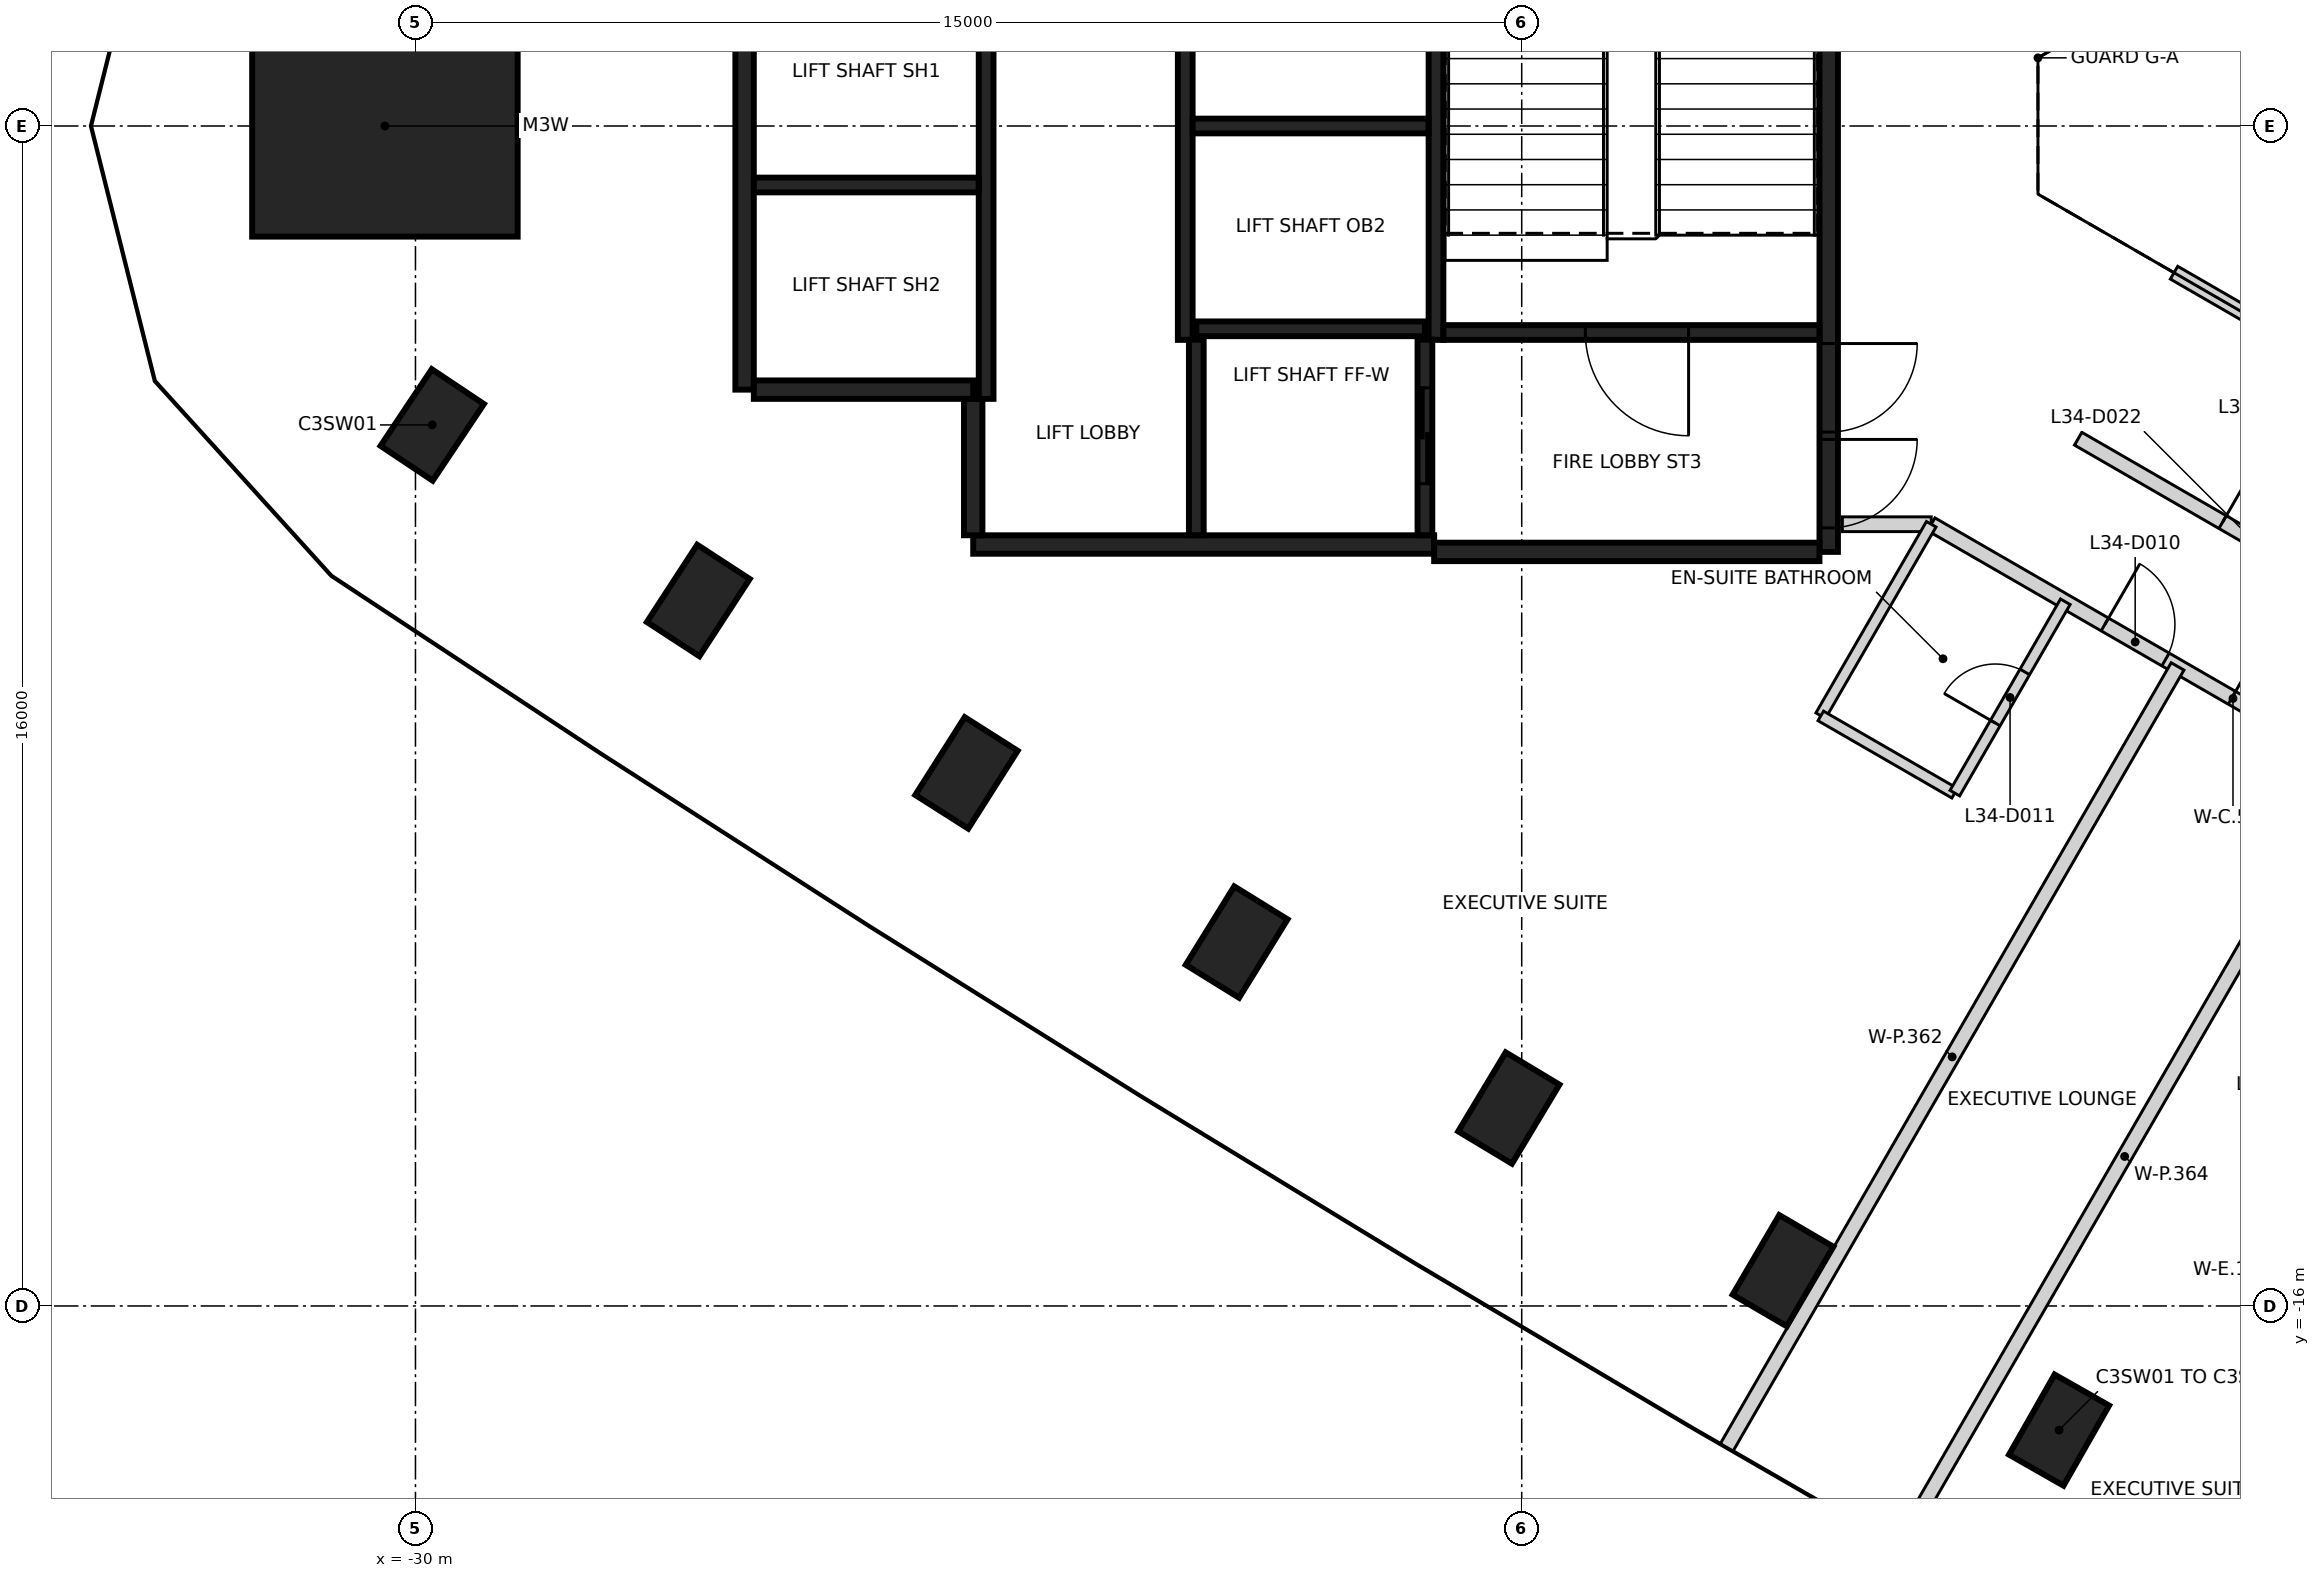
"""IFC4 building model, lengths in metres.
Left out: names, types, materials, properties, quantities, classifications, styles, units other than length and angle.
Written with IfcOpenShell. Run it as: python <this file> out.ifc"""

import sys

from ifc_helpers import new_model, si_unit, direction, frame, frame_2d, origin, origin_2d, place, context, subcontext, project, spatial, rectangle, extrude, element, fill, save


model = new_model("IFC4")
c1 = context("Model", 3, precision=1e-05, world=origin(), true_north=direction((0.0, 1.0)))
c2 = subcontext(c1, "Body", "Model", "MODEL_VIEW")
j1 = project(units=[si_unit("LENGTHUNIT", "METRE"), si_unit("PLANEANGLEUNIT", "RADIAN")], contexts=[c1])
p1 = place(None, origin())
s1 = spatial("IfcSite", under=j1, at=p1, CompositionType="ELEMENT")
p2 = place(p1, origin())
s2 = spatial("IfcBuilding", under=s1, at=p2, CompositionType="ELEMENT")
p3 = place(p2, frame((0.0, 0.0, 139.6)))
s3 = spatial("IfcBuildingStorey", under=s2, at=p3, CompositionType="ELEMENT", Elevation=139.6)
for number, where, z_axis, x_axis in (
    (1, (-29.773, -4.053, -0.4), (0.0, 0.0, 1.0), (0.556, 0.831, 0.0)),
    (2, (-26.165, -6.434, -0.4), (0.0, 0.0, 1.0), (0.546, 0.838, 0.0)),
    (3, (-22.529, -8.772, -0.4), (0.0, 0.0, 1.0), (0.536, 0.844, 0.0)),
    (4, (-18.865, -11.066, -0.4), (0.0, 0.0, 1.0), (0.526, 0.851, 0.0)),
    (5, (-15.175, -13.316, -0.4), (0.0, 0.0, 1.0), (0.515, 0.857, 0.0)),
    (6, (-11.457, -15.522, -0.4), (0.0, 0.0, 1.0), (0.505, 0.863, 0.0)),
    (7, (-7.714, -17.683, -0.4), (0.0, 0.0, 1.0), (0.495, 0.869, 0.0)),
):
    element("IfcColumn", number, at=place(p3, frame(where, z_axis=z_axis, x_axis=x_axis)), inside=s3, PredefinedType="COLUMN", context=c2, shape_type="SweptSolid", body=[
        extrude(rectangle(XDim=1.25, YDim=0.85, at=origin_2d()), origin(), (0.0, 0.0, 1.0), 3.6),
    ])
p4 = place(p3, frame((-30.414, 0.0, -0.4), z_axis=(0.0, 0.0, 1.0), x_axis=(1.0, 0.0, 0.0)))
e8 = element("IfcColumn", 8, at=p4, inside=s3, PredefinedType="COLUMN", context=c2, shape_type="SweptSolid", body=[
    extrude(rectangle(XDim=3.6, YDim=3.0, at=origin_2d()), origin(), (0.0, 0.0, 1.0), 3.6),
])
p5 = place(p3, frame((-10.837, 5.775, 0.0), z_axis=(0.0, 0.0, 1.0), x_axis=(0.0, -1.0, 0.0)))
e9 = element("IfcWall", 9, at=p5, inside=s3, PredefinedType="SHEAR", context=c2, shape_type="SweptSolid", body=[
    extrude(rectangle(XDim=11.55, YDim=0.25, at=frame_2d((5.775, 0.0))), origin(), (0.0, 0.0, 1.0), 3.2),
])
p6 = place(p5, frame((10.025, 0.0, 0.0)))
e10 = element("IfcOpeningElement", 10, at=p6, cuts=e9, PredefinedType="OPENING", context=c2, shape_type="SweptSolid", body=[
    extrude(rectangle(XDim=1.2, YDim=2.1, at=frame_2d((0.6, 1.05))), frame((0.0, 0.135, 0.0), z_axis=(0.0, -1.0, 0.0), x_axis=(1.0, 0.0, 0.0)), (0.0, 0.0, 1.0), 0.27),
])
p7 = place(p5, frame((8.725, 0.0, 0.0)))
e11 = element("IfcOpeningElement", 11, at=p7, cuts=e9, PredefinedType="OPENING", context=c2, shape_type="SweptSolid", body=[
    extrude(rectangle(XDim=1.2, YDim=2.1, at=frame_2d((0.6, 1.05))), frame((0.0, 0.135, 0.0), z_axis=(0.0, -1.0, 0.0), x_axis=(1.0, 0.0, 0.0)), (0.0, 0.0, 1.0), 0.27),
])
p8 = place(p3, frame((-16.187, -5.675, 0.0), z_axis=(0.0, 0.0, 1.0), x_axis=(-1.0, 0.0, 0.0)))
e12 = element("IfcWall", 12, at=p8, inside=s3, PredefinedType="SHEAR", context=c2, shape_type="SweptSolid", body=[
    extrude(rectangle(XDim=6.25, YDim=0.25, at=frame_2d((3.125, 0.0))), origin(), (0.0, 0.0, 1.0), 3.2),
])
p9 = place(p3, frame((-25.537, -3.575, 0.0), z_axis=(0.0, 0.0, 1.0), x_axis=(0.0, 1.0, 0.0)))
e13 = element("IfcWall", 13, at=p9, inside=s3, PredefinedType="SHEAR", context=c2, shape_type="SweptSolid", body=[
    extrude(rectangle(XDim=5.85, YDim=0.25, at=frame_2d((2.925, 0.0))), origin(), (0.0, 0.0, 1.0), 3.2),
])
p10 = place(p3, frame((-10.963, -5.775, 0.0), z_axis=(0.0, 0.0, 1.0), x_axis=(-1.0, 0.0, 0.0)))
e14 = element("IfcWall", 14, at=p10, inside=s3, PredefinedType="SHEAR", context=c2, shape_type="SweptSolid", body=[
    extrude(rectangle(XDim=5.225, YDim=0.25, at=frame_2d((2.612, 0.0))), origin(), (0.0, 0.0, 1.0), 3.2),
])
p11 = place(p3, frame((-22.437, -3.575, 0.0), z_axis=(0.0, 0.0, 1.0), x_axis=(-1.0, 0.0, 0.0)))
e15 = element("IfcWall", 15, at=p11, inside=s3, PredefinedType="SHEAR", context=c2, shape_type="SweptSolid", body=[
    extrude(rectangle(XDim=2.975, YDim=0.25, at=frame_2d((1.487, 0.0))), origin(), (0.0, 0.0, 1.0), 3.2),
])
p12 = place(p3, frame((-22.437, -5.55, 0.0), z_axis=(0.0, 0.0, 1.0), x_axis=(0.0, 1.0, 0.0)))
e16 = element("IfcWall", 16, at=p12, inside=s3, PredefinedType="SHEAR", context=c2, shape_type="SweptSolid", body=[
    extrude(rectangle(XDim=1.849, YDim=0.25, at=frame_2d((0.925, 0.0))), origin(), (0.0, 0.0, 1.0), 3.2),
])
p13 = place(p3, frame((-16.162, 2.951, 0.0), z_axis=(0.0, 0.0, 1.0), x_axis=(0.0, -1.0, 0.0)))
e17 = element("IfcWall", 17, at=p13, inside=s3, PredefinedType="SHEAR", context=c2, shape_type="SweptSolid", body=[
    extrude(rectangle(XDim=5.851, YDim=0.2, at=frame_2d((2.925, 0.0))), origin(), (0.0, 0.0, 1.0), 3.2),
])
for number, where, z_axis, x_axis in (
    (18, (-19.562, -2.9, 0.0), (0.0, 0.0, 1.0), (0.0, 1.0, 0.0)),
    (19, (-22.262, 2.4, 0.0), (0.0, 0.0, 1.0), (0.0, -1.0, 0.0)),
):
    element("IfcWall", number, at=place(p3, frame(where, z_axis=z_axis, x_axis=x_axis)), inside=s3, PredefinedType="SHEAR", context=c2, shape_type="SweptSolid", body=[
        extrude(rectangle(XDim=6.1, YDim=0.2, at=frame_2d((3.05, 0.0))), origin(), (0.0, 0.0, 1.0), 3.2),
    ])
p14 = place(p3, frame((-10.963, -2.8, 0.0), z_axis=(0.0, 0.0, 1.0), x_axis=(-1.0, 0.0, 0.0)))
e20 = element("IfcWall", 20, at=p14, inside=s3, PredefinedType="SHEAR", context=c2, shape_type="SweptSolid", body=[
    extrude(rectangle(XDim=5.098, YDim=0.2, at=frame_2d((2.549, 0.0))), origin(), (0.0, 0.0, 1.0), 3.2),
])
p15 = place(p14, frame((1.774, 0.0, 0.0)))
e21 = element("IfcOpeningElement", 21, at=p15, cuts=e20, PredefinedType="OPENING", context=c2, shape_type="SweptSolid", body=[
    extrude(rectangle(XDim=1.4, YDim=2.1, at=frame_2d((0.7, 1.05))), frame((0.0, 0.11, 0.0), z_axis=(0.0, -1.0, 0.0), x_axis=(1.0, 0.0, 0.0)), (0.0, 0.0, 1.0), 0.22),
])
p16 = place(p3, frame((-16.263, 0.0, 0.0), z_axis=(0.0, 0.0, 1.0), x_axis=(-1.0, 0.0, 0.0)))
e22 = element("IfcWall", 22, at=p16, inside=s3, PredefinedType="SHEAR", context=c2, shape_type="SweptSolid", body=[
    extrude(rectangle(XDim=3.198, YDim=0.2, at=frame_2d((1.599, 0.0))), origin(), (0.0, 0.0, 1.0), 3.2),
])
p17 = place(p3, frame((-22.363, -0.8, 0.0), z_axis=(0.0, 0.0, 1.0), x_axis=(-1.0, 0.0, 0.0)))
e23 = element("IfcWall", 23, at=p17, inside=s3, PredefinedType="SHEAR", context=c2, shape_type="SweptSolid", body=[
    extrude(rectangle(XDim=3.048, YDim=0.2, at=frame_2d((1.524, 0.0))), origin(), (0.0, 0.0, 1.0), 3.2),
])
p18 = place(p3, frame((-19.412, -2.75, 0.0), z_axis=(0.0, 0.0, 1.0), x_axis=(1.0, 0.0, 0.0)))
e24 = element("IfcWall", 24, at=p18, inside=s3, PredefinedType="SHEAR", context=c2, shape_type="SweptSolid", body=[
    extrude(rectangle(XDim=3.1, YDim=0.2, at=frame_2d((1.55, 0.0))), origin(), (0.0, 0.0, 1.0), 3.2),
])
p19 = place(p3, frame((-16.312, -2.898, 0.0), z_axis=(0.0, 0.0, 1.0), x_axis=(0.0, -1.0, 0.0)))
e25 = element("IfcWall", 25, at=p19, inside=s3, PredefinedType="SHEAR", context=c2, shape_type="SweptSolid", body=[
    extrude(rectangle(XDim=2.651, YDim=0.2, at=frame_2d((1.325, 0.0))), origin(), (0.0, 0.0, 1.0), 3.2),
])
p20 = place(p19, frame((0.652, 0.0, 0.0)))
e26 = element("IfcOpeningElement", 26, at=p20, cuts=e25, PredefinedType="OPENING", context=c2, shape_type="SweptSolid", body=[
    extrude(rectangle(XDim=1.3, YDim=2.1, at=frame_2d((0.65, 1.05))), frame((0.0, 0.11, 0.0), z_axis=(0.0, -1.0, 0.0), x_axis=(1.0, 0.0, 0.0)), (0.0, 0.0, 1.0), 0.22),
])
p21 = place(p3, frame((-19.412, -5.549, 0.0), z_axis=(0.0, 0.0, 1.0), x_axis=(0.0, 1.0, 0.0)))
e27 = element("IfcWall", 27, at=p21, inside=s3, PredefinedType="SHEAR", context=c2, shape_type="SweptSolid", body=[
    extrude(rectangle(XDim=2.651, YDim=0.2, at=frame_2d((1.325, 0.0))), origin(), (0.0, 0.0, 1.0), 3.2),
])
p22 = place(p3, frame((-10.652, -5.4, 0.0), z_axis=(0.0, 0.0, 1.0), x_axis=(1.0, 0.0, 0.0)))
e28 = element("IfcWall", 28, at=p22, inside=s3, PredefinedType="PARTITIONING", context=c2, shape_type="SweptSolid", body=[
    extrude(rectangle(XDim=1.205, YDim=0.2, at=frame_2d((0.603, 0.0))), origin(), (0.0, 0.0, 1.0), 3.2),
])
p23 = place(p3, frame((-9.447, -5.4, 0.0), z_axis=(0.0, 0.0, 1.0), x_axis=(0.866101262146, -0.49986858644, 0.0)))
e29 = element("IfcWall", 29, at=p23, inside=s3, PredefinedType="PARTITIONING", context=c2, shape_type="SweptSolid", body=[
    extrude(rectangle(XDim=9.449, YDim=0.2, at=frame_2d((4.724, 0.0))), origin(), (0.0, 0.0, 1.0), 3.2),
])
p24 = place(p23, frame((2.718, 0.0, 0.0)))
e30 = element("IfcOpeningElement", 30, at=p24, cuts=e29, PredefinedType="OPENING", context=c2, shape_type="SweptSolid", body=[
    extrude(rectangle(XDim=0.95, YDim=2.1, at=frame_2d((0.475, 1.05))), frame((0.0, 0.11, 0.0), z_axis=(0.0, -1.0, 0.0), x_axis=(1.0, 0.0, 0.0)), (0.0, 0.0, 1.0), 0.22),
])
p25 = place(p23, frame((4.707, 0.0, 0.0)))
e31 = element("IfcOpeningElement", 31, at=p25, cuts=e29, PredefinedType="OPENING", context=c2, shape_type="SweptSolid", body=[
    extrude(rectangle(XDim=1.0, YDim=2.1, at=frame_2d((0.5, 1.05))), frame((0.0, 0.11, 0.0), z_axis=(0.0, -1.0, 0.0), x_axis=(1.0, 0.0, 0.0)), (0.0, 0.0, 1.0), 0.22),
])
p26 = place(p23, frame((6.746, 0.0, 0.0)))
e32 = element("IfcOpeningElement", 32, at=p26, cuts=e29, PredefinedType="OPENING", context=c2, shape_type="SweptSolid", body=[
    extrude(rectangle(XDim=0.95, YDim=2.1, at=frame_2d((0.475, 1.05))), frame((0.0, 0.11, 0.0), z_axis=(0.0, -1.0, 0.0), x_axis=(1.0, 0.0, 0.0)), (0.0, 0.0, 1.0), 0.22),
])
p27 = place(p3, frame((-7.455, -4.24, 0.0), z_axis=(0.0, 0.0, 1.0), x_axis=(0.866015783746, -0.500016662025, 0.0)))
e33 = element("IfcWall", 33, at=p27, inside=s3, PredefinedType="PARTITIONING", context=c2, shape_type="SweptSolid", body=[
    extrude(rectangle(XDim=10.009, YDim=0.2, at=frame_2d((5.004, 0.0))), origin(), (0.0, 0.0, 1.0), 3.2),
])
p28 = place(p27, frame((2.262, 0.0, 0.0)))
e34 = element("IfcOpeningElement", 34, at=p28, cuts=e33, PredefinedType="OPENING", context=c2, shape_type="SweptSolid", body=[
    extrude(rectangle(XDim=0.9, YDim=2.1, at=frame_2d((0.45, 1.05))), frame((0.0, 0.11, 0.0), z_axis=(0.0, -1.0, 0.0), x_axis=(1.0, 0.0, 0.0)), (0.0, 0.0, 1.0), 0.22),
])
p29 = place(p27, frame((7.254, 0.0, 0.0)))
e35 = element("IfcOpeningElement", 35, at=p29, cuts=e33, PredefinedType="OPENING", context=c2, shape_type="SweptSolid", body=[
    extrude(rectangle(XDim=0.9, YDim=2.1, at=frame_2d((0.45, 1.05))), frame((0.0, 0.11, 0.0), z_axis=(0.0, -1.0, 0.0), x_axis=(1.0, 0.0, 0.0)), (0.0, 0.0, 1.0), 0.22),
])
p30 = place(p3, frame((-12.22, -17.917, 0.0), z_axis=(0.0, 0.0, 1.0), x_axis=(0.499963860175, 0.866046268117, 0.0)))
e36 = element("IfcWall", 36, at=p30, inside=s3, PredefinedType="PARTITIONING", context=c2, shape_type="SweptSolid", body=[
    extrude(rectangle(XDim=12.227, YDim=0.2, at=frame_2d((6.114, 0.0))), origin(), (0.0, 0.0, 1.0), 2.3),
])
p31 = place(p3, frame((-9.882, -19.267, 0.0), z_axis=(0.0, 0.0, 1.0), x_axis=(0.499993811829, 0.866028976497, 0.0)))
e37 = element("IfcWall", 37, at=p31, inside=s3, PredefinedType="PARTITIONING", context=c2, shape_type="SweptSolid", body=[
    extrude(rectangle(XDim=12.227, YDim=0.2, at=frame_2d((6.114, 0.0))), origin(), (0.0, 0.0, 1.0), 2.3),
])
p32 = place(p3, frame((-6.155, -1.989, 0.0), z_axis=(0.0, 0.0, 1.0), x_axis=(0.866009062299, -0.500028303215, 0.0)))
e38 = element("IfcWall", 38, at=p32, inside=s3, PredefinedType="PARTITIONING", context=c2, shape_type="SweptSolid", body=[
    extrude(rectangle(XDim=10.802, YDim=0.2, at=frame_2d((5.401, 0.0))), origin(), (0.0, 0.0, 1.0), 2.3),
])
p33 = place(p3, frame((-5.173, -21.926, 0.0), z_axis=(0.0, 0.0, 1.0), x_axis=(0.499941227542, 0.86605933342, 0.0)))
e39 = element("IfcWall", 39, at=p33, inside=s3, PredefinedType="PARTITIONING", context=c2, shape_type="SweptSolid", body=[
    extrude(rectangle(XDim=5.249, YDim=0.2, at=frame_2d((2.625, 0.0))), origin(), (0.0, 0.0, 1.0), 3.2),
])
p34 = place(p3, frame((-10.946, -7.996, 0.0), z_axis=(0.0, 0.0, 1.0), x_axis=(0.500027927039, 0.866009279501, 0.0)))
e40 = element("IfcWall", 40, at=p34, inside=s3, PredefinedType="PARTITIONING", context=c2, shape_type="SweptSolid", body=[
    extrude(rectangle(XDim=2.998, YDim=0.15, at=frame_2d((1.499, 0.0))), origin(), (0.0, 0.0, 1.0), 3.2),
])
p35 = place(p3, frame((-10.945, -7.999, 0.0), z_axis=(0.0, 0.0, 1.0), x_axis=(0.866005190944, -0.500035008033, 0.0)))
e41 = element("IfcWall", 41, at=p35, inside=s3, PredefinedType="PARTITIONING", context=c2, shape_type="SweptSolid", body=[
    extrude(rectangle(XDim=2.096, YDim=0.15, at=frame_2d((1.048, 0.0))), origin(), (0.0, 0.0, 1.0), 3.2),
])
p36 = place(p3, frame((-9.127, -9.046, 0.0), z_axis=(0.0, 0.0, 1.0), x_axis=(0.499959910729, 0.866048548099, 0.0)))
e42 = element("IfcWall", 42, at=p36, inside=s3, PredefinedType="PARTITIONING", context=c2, shape_type="SweptSolid", body=[
    extrude(rectangle(XDim=2.996, YDim=0.15, at=frame_2d((1.498, 0.0))), origin(), (0.0, 0.0, 1.0), 3.2),
])
p37 = place(p36, frame((1.098, 0.0, 0.0)))
e43 = element("IfcOpeningElement", 43, at=p37, cuts=e42, PredefinedType="OPENING", context=c2, shape_type="SweptSolid", body=[
    extrude(rectangle(XDim=0.8, YDim=2.1, at=frame_2d((0.4, 1.05))), frame((0.0, 0.085, 0.0), z_axis=(0.0, -1.0, 0.0), x_axis=(1.0, 0.0, 0.0)), (0.0, 0.0, 1.0), 0.17),
])
p38 = place(p20, origin())
e44 = element("IfcDoor", 44, at=p38, inside=s3, OperationType="SLIDING_TO_RIGHT", PredefinedType="DOOR", context=c2, shape_type="SweptSolid", body=[
    extrude(rectangle(XDim=1.3, YDim=2.1, at=frame_2d((0.65, 1.05))), frame((0.0, 0.025, 0.0), z_axis=(0.0, -1.0, 0.0), x_axis=(1.0, 0.0, 0.0)), (0.0, 0.0, 1.0), 0.05),
])
fill(e26, e44)
p39 = place(p6, origin())
e45 = element("IfcDoor", 45, at=p39, inside=s3, OperationType="SINGLE_SWING_LEFT", PredefinedType="DOOR", context=c2, shape_type="SweptSolid", body=[
    extrude(rectangle(XDim=1.2, YDim=2.1, at=frame_2d((0.6, 1.05))), frame((0.0, 0.025, 0.0), z_axis=(0.0, -1.0, 0.0), x_axis=(1.0, 0.0, 0.0)), (0.0, 0.0, 1.0), 0.05),
])
fill(e10, e45)
p40 = place(p7, origin())
e46 = element("IfcDoor", 46, at=p40, inside=s3, OperationType="SINGLE_SWING_RIGHT", PredefinedType="DOOR", context=c2, shape_type="SweptSolid", body=[
    extrude(rectangle(XDim=1.2, YDim=2.1, at=frame_2d((0.6, 1.05))), frame((0.0, 0.025, 0.0), z_axis=(0.0, -1.0, 0.0), x_axis=(1.0, 0.0, 0.0)), (0.0, 0.0, 1.0), 0.05),
])
fill(e11, e46)
p41 = place(p15, origin())
e47 = element("IfcDoor", 47, at=p41, inside=s3, OperationType="SINGLE_SWING_RIGHT", PredefinedType="DOOR", context=c2, shape_type="SweptSolid", body=[
    extrude(rectangle(XDim=1.4, YDim=2.1, at=frame_2d((0.7, 1.05))), frame((0.0, 0.025, 0.0), z_axis=(0.0, -1.0, 0.0), x_axis=(1.0, 0.0, 0.0)), (0.0, 0.0, 1.0), 0.05),
])
fill(e21, e47)
p42 = place(p24, frame((0.95, 0.0, 0.0), z_axis=(0.0, 0.0, 1.0), x_axis=(-1.0, 0.0, 0.0)))
e48 = element("IfcDoor", 48, at=p42, inside=s3, OperationType="SINGLE_SWING_LEFT", PredefinedType="DOOR", context=c2, shape_type="SweptSolid", body=[
    extrude(rectangle(XDim=0.95, YDim=2.1, at=frame_2d((0.475, 1.05))), frame((0.0, 0.025, 0.0), z_axis=(0.0, -1.0, 0.0), x_axis=(1.0, 0.0, 0.0)), (0.0, 0.0, 1.0), 0.05),
])
fill(e30, e48)
p43 = place(p37, origin())
e49 = element("IfcDoor", 49, at=p43, inside=s3, OperationType="SINGLE_SWING_LEFT", PredefinedType="DOOR", context=c2, shape_type="SweptSolid", body=[
    extrude(rectangle(XDim=0.8, YDim=2.1, at=frame_2d((0.4, 1.05))), frame((0.0, 0.025, 0.0), z_axis=(0.0, -1.0, 0.0), x_axis=(1.0, 0.0, 0.0)), (0.0, 0.0, 1.0), 0.05),
])
fill(e43, e49)
p44 = place(p25, frame((1.0, 0.0, 0.0), z_axis=(0.0, 0.0, 1.0), x_axis=(-1.0, 0.0, 0.0)))
e50 = element("IfcDoor", 50, at=p44, inside=s3, OperationType="SINGLE_SWING_LEFT", PredefinedType="DOOR", context=c2, shape_type="SweptSolid", body=[
    extrude(rectangle(XDim=1.0, YDim=2.1, at=frame_2d((0.5, 1.05))), frame((0.0, 0.025, 0.0), z_axis=(0.0, -1.0, 0.0), x_axis=(1.0, 0.0, 0.0)), (0.0, 0.0, 1.0), 0.05),
])
fill(e31, e50)
p45 = place(p28, origin())
e51 = element("IfcDoor", 51, at=p45, inside=s3, OperationType="SINGLE_SWING_LEFT", PredefinedType="DOOR", context=c2, shape_type="SweptSolid", body=[
    extrude(rectangle(XDim=0.9, YDim=2.1, at=frame_2d((0.45, 1.05))), frame((0.0, 0.025, 0.0), z_axis=(0.0, -1.0, 0.0), x_axis=(1.0, 0.0, 0.0)), (0.0, 0.0, 1.0), 0.05),
])
fill(e34, e51)
save(model, sys.argv[1])
